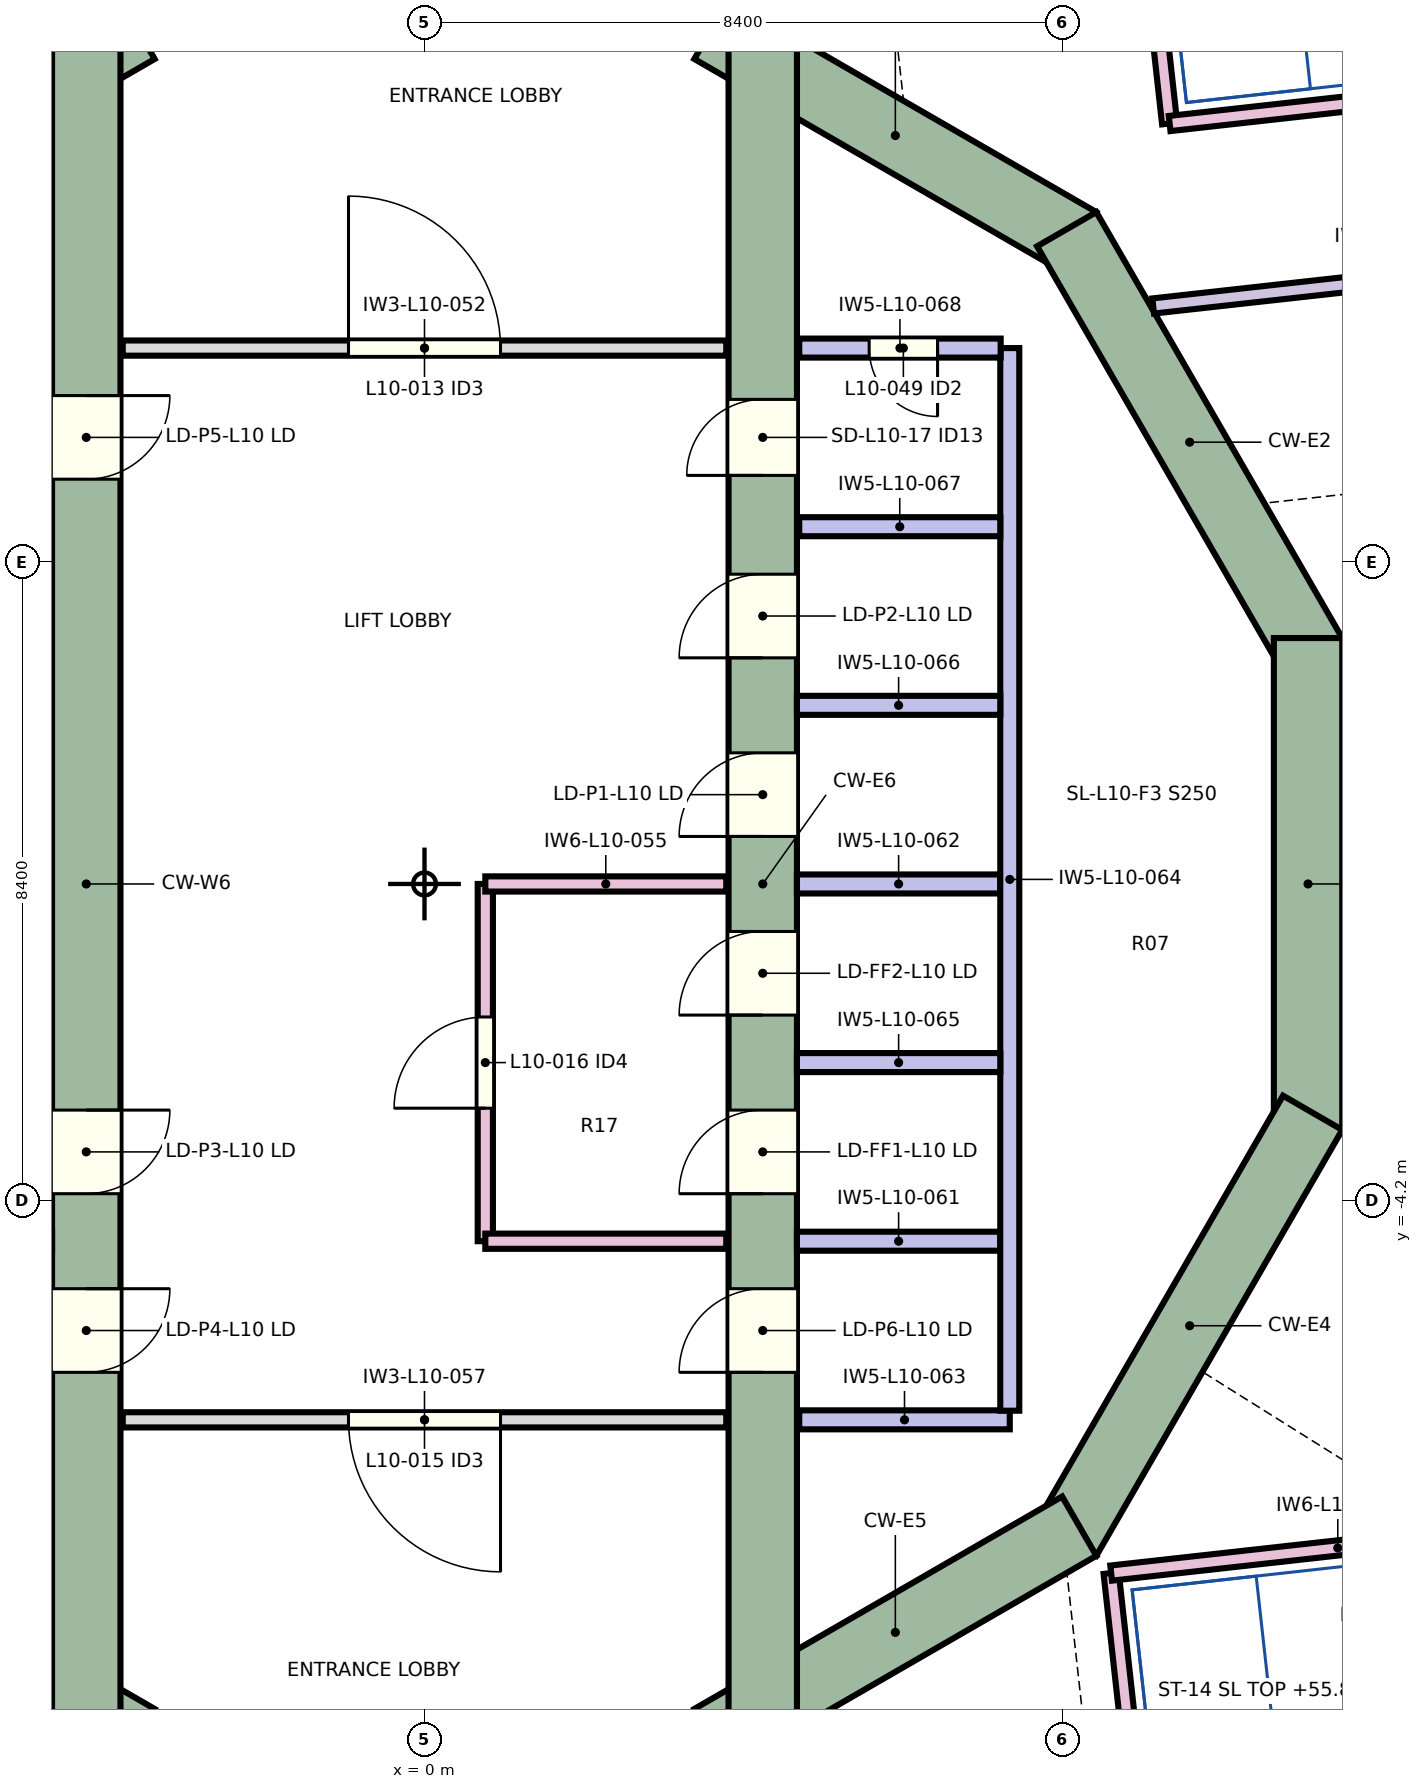
"""IFC4 building model, lengths in metres.
Left out: names, types, materials, properties, quantities, classifications, styles, units other than length and angle.
Written with IfcOpenShell. Run it as: python <this file> out.ifc"""

import sys

from ifc_helpers import new_model, si_unit, direction, frame, frame_2d, origin, place, context, subcontext, project, spatial, rectangle, extrude, element, fill, save


model = new_model("IFC4")
c1 = context("Model", 3, precision=1e-05, world=origin(), true_north=direction((0.0, 1.0)))
c2 = subcontext(c1, "Body", "Model", "MODEL_VIEW")
j1 = project(units=[si_unit("LENGTHUNIT", "METRE"), si_unit("PLANEANGLEUNIT", "RADIAN")], contexts=[c1])
p1 = place(None, origin())
s1 = spatial("IfcSite", under=j1, at=p1, CompositionType="ELEMENT")
p2 = place(p1, origin())
s2 = spatial("IfcBuilding", under=s1, at=p2, CompositionType="ELEMENT")
p3 = place(p2, frame((0.0, 0.0, 53.9)))
s3 = spatial("IfcBuildingStorey", under=s2, at=p3, CompositionType="ELEMENT", Elevation=53.9)
for number, where, z_axis, x_axis in (
    (1, (-3.775, -11.243, 0.0), (0.0, 0.0, 1.0), (-0.866, 0.5, 0.0)),
    (2, (-8.614, 8.449, 0.0), (0.0, 0.0, 1.0), (0.866, 0.5, 0.0)),
):
    element("IfcWall", number, at=place(p3, frame(where, z_axis=z_axis, x_axis=x_axis)), inside=s3, PredefinedType="SHEAR", context=c2, shape_type="SweptSolid", body=[
        extrude(rectangle(XDim=5.587, YDim=0.9, at=frame_2d((2.794, 0.0))), origin(), (0.0, 0.0, 1.0), 3.8),
    ])
p4 = place(p3, frame((-4.45, 11.633, 0.0), z_axis=(0.0, 0.0, 1.0), x_axis=(0.0, -1.0, 0.0)))
e3 = element("IfcWall", 3, at=p4, inside=s3, PredefinedType="SHEAR", context=c2, shape_type="SweptSolid", body=[
    extrude(rectangle(XDim=23.265, YDim=0.9, at=frame_2d((11.633, 0.0))), origin(), (0.0, 0.0, 1.0), 3.8),
])
p5 = place(p4, frame((14.607, 0.0, 0.0)))
e4 = element("IfcOpeningElement", 4, at=p5, cuts=e3, PredefinedType="OPENING", context=c2, shape_type="SweptSolid", body=[
    extrude(rectangle(XDim=1.1, YDim=2.1, at=frame_2d((0.55, 1.05))), frame((0.0, 0.46, 0.0), z_axis=(0.0, -1.0, 0.0), x_axis=(1.0, 0.0, 0.0)), (0.0, 0.0, 1.0), 0.92),
])
p6 = place(p4, frame((16.958, 0.0, 0.0)))
e5 = element("IfcOpeningElement", 5, at=p6, cuts=e3, PredefinedType="OPENING", context=c2, shape_type="SweptSolid", body=[
    extrude(rectangle(XDim=1.1, YDim=2.1, at=frame_2d((0.55, 1.05))), frame((0.0, 0.46, 0.0), z_axis=(0.0, -1.0, 0.0), x_axis=(1.0, 0.0, 0.0)), (0.0, 0.0, 1.0), 0.92),
])
p7 = place(p4, frame((5.208, 0.0, 0.0)))
e6 = element("IfcOpeningElement", 6, at=p7, cuts=e3, PredefinedType="OPENING", context=c2, shape_type="SweptSolid", body=[
    extrude(rectangle(XDim=1.1, YDim=2.1, at=frame_2d((0.55, 1.05))), frame((0.0, 0.46, 0.0), z_axis=(0.0, -1.0, 0.0), x_axis=(1.0, 0.0, 0.0)), (0.0, 0.0, 1.0), 0.92),
])
p8 = place(p3, frame((3.775, 11.243, 0.0), z_axis=(0.0, 0.0, 1.0), x_axis=(0.866026961591, -0.49999730179, 0.0)))
e7 = element("IfcWall", 7, at=p8, inside=s3, PredefinedType="SHEAR", context=c2, shape_type="SweptSolid", body=[
    extrude(rectangle(XDim=5.587, YDim=0.9, at=frame_2d((2.794, 0.0))), origin(), (0.0, 0.0, 1.0), 3.8),
])
p9 = place(p3, frame((8.449, 8.614, 0.0), z_axis=(0.0, 0.0, 1.0), x_axis=(0.499990282633, -0.866031014036, 0.0)))
e8 = element("IfcWall", 8, at=p9, inside=s3, PredefinedType="SHEAR", context=c2, shape_type="SweptSolid", body=[
    extrude(rectangle(XDim=6.47, YDim=0.9, at=frame_2d((3.235, 0.0))), origin(), (0.0, 0.0, 1.0), 3.8),
])
p10 = place(p3, frame((11.624, 3.235, 0.0), z_axis=(0.0, 0.0, 1.0), x_axis=(0.0, -1.0, 0.0)))
e9 = element("IfcWall", 9, at=p10, inside=s3, PredefinedType="SHEAR", context=c2, shape_type="SweptSolid", body=[
    extrude(rectangle(XDim=6.471, YDim=0.9, at=frame_2d((3.235, 0.0))), origin(), (0.0, 0.0, 1.0), 3.8),
])
p11 = place(p3, frame((11.684, -3.01, 0.0), z_axis=(0.0, 0.0, 1.0), x_axis=(-0.499990282633, -0.866031014036, 0.0)))
e10 = element("IfcWall", 10, at=p11, inside=s3, PredefinedType="SHEAR", context=c2, shape_type="SweptSolid", body=[
    extrude(rectangle(XDim=6.47, YDim=0.9, at=frame_2d((3.235, 0.0))), origin(), (0.0, 0.0, 1.0), 3.8),
])
p12 = place(p3, frame((8.614, -8.449, 0.0), z_axis=(0.0, 0.0, 1.0), x_axis=(-0.866026961591, -0.49999730179, 0.0)))
e11 = element("IfcWall", 11, at=p12, inside=s3, PredefinedType="SHEAR", context=c2, shape_type="SweptSolid", body=[
    extrude(rectangle(XDim=5.587, YDim=0.9, at=frame_2d((2.794, 0.0))), origin(), (0.0, 0.0, 1.0), 3.8),
])
p13 = place(p3, frame((4.45, -11.633, 0.0), z_axis=(0.0, 0.0, 1.0), x_axis=(0.0, 1.0, 0.0)))
e12 = element("IfcWall", 12, at=p13, inside=s3, PredefinedType="SHEAR", context=c2, shape_type="SweptSolid", body=[
    extrude(rectangle(XDim=23.265, YDim=0.9, at=frame_2d((11.633, 0.0))), origin(), (0.0, 0.0, 1.0), 3.8),
])
p14 = place(p13, frame((7.558, 0.0, 0.0)))
e13 = element("IfcOpeningElement", 13, at=p14, cuts=e12, PredefinedType="OPENING", context=c2, shape_type="SweptSolid", body=[
    extrude(rectangle(XDim=1.1, YDim=2.1, at=frame_2d((0.55, 1.05))), frame((0.0, 0.46, 0.0), z_axis=(0.0, -1.0, 0.0), x_axis=(1.0, 0.0, 0.0)), (0.0, 0.0, 1.0), 0.92),
])
p15 = place(p13, frame((9.907, 0.0, 0.0)))
e14 = element("IfcOpeningElement", 14, at=p15, cuts=e12, PredefinedType="OPENING", context=c2, shape_type="SweptSolid", body=[
    extrude(rectangle(XDim=1.1, YDim=2.1, at=frame_2d((0.55, 1.05))), frame((0.0, 0.46, 0.0), z_axis=(0.0, -1.0, 0.0), x_axis=(1.0, 0.0, 0.0)), (0.0, 0.0, 1.0), 0.92),
])
p16 = place(p13, frame((12.258, 0.0, 0.0)))
e15 = element("IfcOpeningElement", 15, at=p16, cuts=e12, PredefinedType="OPENING", context=c2, shape_type="SweptSolid", body=[
    extrude(rectangle(XDim=1.1, YDim=2.1, at=frame_2d((0.55, 1.05))), frame((0.0, 0.46, 0.0), z_axis=(0.0, -1.0, 0.0), x_axis=(1.0, 0.0, 0.0)), (0.0, 0.0, 1.0), 0.92),
])
p17 = place(p13, frame((14.607, 0.0, 0.0)))
e16 = element("IfcOpeningElement", 16, at=p17, cuts=e12, PredefinedType="OPENING", context=c2, shape_type="SweptSolid", body=[
    extrude(rectangle(XDim=1.1, YDim=2.1, at=frame_2d((0.55, 1.05))), frame((0.0, 0.46, 0.0), z_axis=(0.0, -1.0, 0.0), x_axis=(1.0, 0.0, 0.0)), (0.0, 0.0, 1.0), 0.92),
])
p18 = place(p13, frame((5.208, 0.0, 0.0)))
e17 = element("IfcOpeningElement", 17, at=p18, cuts=e12, PredefinedType="OPENING", context=c2, shape_type="SweptSolid", body=[
    extrude(rectangle(XDim=1.1, YDim=2.1, at=frame_2d((0.55, 1.05))), frame((0.0, 0.46, 0.0), z_axis=(0.0, -1.0, 0.0), x_axis=(1.0, 0.0, 0.0)), (0.0, 0.0, 1.0), 0.92),
])
p19 = place(p13, frame((17.008, 0.0, 0.0)))
e18 = element("IfcOpeningElement", 18, at=p19, cuts=e12, PredefinedType="OPENING", context=c2, shape_type="SweptSolid", body=[
    extrude(rectangle(XDim=1.0, YDim=2.1, at=frame_2d((0.5, 1.05))), frame((0.0, 0.46, 0.0), z_axis=(0.0, -1.0, 0.0), x_axis=(1.0, 0.0, 0.0)), (0.0, 0.0, 1.0), 0.92),
])
p20 = place(p3, frame((-3.97, 7.05, 0.0), z_axis=(0.0, 0.0, 1.0), x_axis=(1.0, 0.0, 0.0)))
e19 = element("IfcWall", 19, at=p20, inside=s3, PredefinedType="PARTITIONING", context=c2, shape_type="SweptSolid", body=[
    extrude(rectangle(XDim=7.94, YDim=0.2, at=frame_2d((3.97, 0.0))), origin(), (0.0, 0.0, 1.0), 3.55),
])
p21 = place(p20, frame((2.97, 0.0, 0.0)))
e20 = element("IfcOpeningElement", 20, at=p21, cuts=e19, PredefinedType="OPENING", context=c2, shape_type="SweptSolid", body=[
    extrude(rectangle(XDim=2.0, YDim=2.1, at=frame_2d((1.0, 1.05))), frame((0.0, 0.11, 0.0), z_axis=(0.0, -1.0, 0.0), x_axis=(1.0, 0.0, 0.0)), (0.0, 0.0, 1.0), 0.22),
])
p22 = place(p3, frame((0.8, -4.7, 0.0), z_axis=(0.0, 0.0, 1.0), x_axis=(0.0, 1.0, 0.0)))
e21 = element("IfcWall", 21, at=p22, inside=s3, PredefinedType="SOLIDWALL", context=c2, shape_type="SweptSolid", body=[
    extrude(rectangle(XDim=4.7, YDim=0.2, at=frame_2d((2.35, 0.0))), origin(), (0.0, 0.0, 1.0), 3.55),
])
p23 = place(p22, frame((1.75, 0.0, 0.0)))
e22 = element("IfcOpeningElement", 22, at=p23, cuts=e21, PredefinedType="OPENING", context=c2, shape_type="SweptSolid", body=[
    extrude(rectangle(XDim=1.2, YDim=2.1, at=frame_2d((0.6, 1.05))), frame((0.0, 0.11, 0.0), z_axis=(0.0, -1.0, 0.0), x_axis=(1.0, 0.0, 0.0)), (0.0, 0.0, 1.0), 0.22),
])
p24 = place(p3, frame((0.8, 0.0, 0.0), z_axis=(0.0, 0.0, 1.0), x_axis=(1.0, 0.0, 0.0)))
e23 = element("IfcWall", 23, at=p24, inside=s3, PredefinedType="SOLIDWALL", context=c2, shape_type="SweptSolid", body=[
    extrude(rectangle(XDim=3.17, YDim=0.2, at=frame_2d((1.585, 0.0))), origin(), (0.0, 0.0, 1.0), 3.55),
])
p25 = place(p3, frame((3.97, -7.05, 0.0), z_axis=(0.0, 0.0, 1.0), x_axis=(-1.0, 0.0, 0.0)))
e24 = element("IfcWall", 24, at=p25, inside=s3, PredefinedType="PARTITIONING", context=c2, shape_type="SweptSolid", body=[
    extrude(rectangle(XDim=7.94, YDim=0.2, at=frame_2d((3.97, 0.0))), origin(), (0.0, 0.0, 1.0), 3.55),
])
p26 = place(p25, frame((2.97, 0.0, 0.0)))
e25 = element("IfcOpeningElement", 25, at=p26, cuts=e24, PredefinedType="OPENING", context=c2, shape_type="SweptSolid", body=[
    extrude(rectangle(XDim=2.0, YDim=2.1, at=frame_2d((1.0, 1.05))), frame((0.0, 0.11, 0.0), z_axis=(0.0, -1.0, 0.0), x_axis=(1.0, 0.0, 0.0)), (0.0, 0.0, 1.0), 0.22),
])
p27 = place(p3, frame((3.97, -4.7, 0.0), z_axis=(0.0, 0.0, 1.0), x_axis=(-1.0, 0.0, 0.0)))
e26 = element("IfcWall", 26, at=p27, inside=s3, PredefinedType="SOLIDWALL", context=c2, shape_type="SweptSolid", body=[
    extrude(rectangle(XDim=3.17, YDim=0.2, at=frame_2d((1.585, 0.0))), origin(), (0.0, 0.0, 1.0), 3.55),
])
for number, where, z_axis, x_axis in (
    (27, (4.9, -4.7, 0.0), (0.0, 0.0, 1.0), (1.0, 0.0, 0.0)),
    (28, (4.9, 0.0, 0.0), (0.0, 0.0, 1.0), (1.0, 0.0, 0.0)),
):
    element("IfcWall", number, at=place(p3, frame(where, z_axis=z_axis, x_axis=x_axis)), inside=s3, PredefinedType="SOLIDWALL", context=c2, shape_type="SweptSolid", body=[
        extrude(rectangle(XDim=2.675, YDim=0.25, at=frame_2d((1.337, 0.0))), origin(), (0.0, 0.0, 1.0), 3.55),
    ])
p28 = place(p3, frame((4.93, -7.05, 0.0), z_axis=(0.0, 0.0, 1.0), x_axis=(1.0, 0.0, 0.0)))
e29 = element("IfcWall", 29, at=p28, inside=s3, PredefinedType="SOLIDWALL", context=c2, shape_type="SweptSolid", body=[
    extrude(rectangle(XDim=2.77, YDim=0.25, at=frame_2d((1.385, 0.0))), origin(), (0.0, 0.0, 1.0), 3.55),
])
p29 = place(p3, frame((7.7, -6.93, 0.0), z_axis=(0.0, 0.0, 1.0), x_axis=(0.0, 1.0, 0.0)))
e30 = element("IfcWall", 30, at=p29, inside=s3, PredefinedType="SOLIDWALL", context=c2, shape_type="SweptSolid", body=[
    extrude(rectangle(XDim=13.98, YDim=0.25, at=frame_2d((6.99, 0.0))), origin(), (0.0, 0.0, 1.0), 3.55),
])
for number, where, z_axis, x_axis in (
    (31, (7.575, -2.35, 0.0), (0.0, 0.0, 1.0), (-1.0, 0.0, 0.0)),
    (32, (7.575, 2.35, 0.0), (0.0, 0.0, 1.0), (-1.0, 0.0, 0.0)),
):
    element("IfcWall", number, at=place(p3, frame(where, z_axis=z_axis, x_axis=x_axis)), inside=s3, PredefinedType="SOLIDWALL", context=c2, shape_type="SweptSolid", body=[
        extrude(rectangle(XDim=2.675, YDim=0.25, at=frame_2d((1.337, 0.0))), origin(), (0.0, 0.0, 1.0), 3.55),
    ])
p30 = place(p3, frame((7.575, 4.7, 0.0), z_axis=(0.0, 0.0, 1.0), x_axis=(-1.0, 0.0, 0.0)))
e33 = element("IfcWall", 33, at=p30, inside=s3, PredefinedType="SOLIDWALL", context=c2, shape_type="SweptSolid", body=[
    extrude(rectangle(XDim=2.645, YDim=0.25, at=frame_2d((1.323, 0.0))), origin(), (0.0, 0.0, 1.0), 3.55),
])
p31 = place(p3, frame((7.58, 7.05, 0.0), z_axis=(0.0, 0.0, 1.0), x_axis=(-1.0, 0.0, 0.0)))
e34 = element("IfcWall", 34, at=p31, inside=s3, PredefinedType="SOLIDWALL", context=c2, shape_type="SweptSolid", body=[
    extrude(rectangle(XDim=2.65, YDim=0.25, at=frame_2d((1.325, 0.0))), origin(), (0.0, 0.0, 1.0), 3.55),
])
p32 = place(p31, frame((0.83, 0.0, 0.0)))
e35 = element("IfcOpeningElement", 35, at=p32, cuts=e34, PredefinedType="OPENING", context=c2, shape_type="SweptSolid", body=[
    extrude(rectangle(XDim=0.9, YDim=2.1, at=frame_2d((0.45, 1.05))), frame((0.0, 0.135, 0.0), z_axis=(0.0, -1.0, 0.0), x_axis=(1.0, 0.0, 0.0)), (0.0, 0.0, 1.0), 0.27),
])
p33 = place(p3, frame((9.033, -9.066, 0.0), z_axis=(0.0, 0.0, 1.0), x_axis=(0.11030110325, -0.993898217436, 0.0)))
e36 = element("IfcWall", 36, at=p33, inside=s3, PredefinedType="SOLIDWALL", context=c2, shape_type="SweptSolid", body=[
    extrude(rectangle(XDim=3.493, YDim=0.2, at=frame_2d((1.746, 0.0))), origin(), (0.0, 0.0, 1.0), 3.55),
])
p34 = place(p3, frame((9.434, 13.334, 0.0), z_axis=(0.0, 0.0, 1.0), x_axis=(0.11027153821, -0.993901498067, 0.0)))
e37 = element("IfcWall", 37, at=p34, inside=s3, PredefinedType="SOLIDWALL", context=c2, shape_type="SweptSolid", body=[
    extrude(rectangle(XDim=3.35, YDim=0.2, at=frame_2d((1.675, 0.0))), origin(), (0.0, 0.0, 1.0), 3.55),
])
p35 = place(p3, frame((9.586, 7.604, 0.0), z_axis=(0.0, 0.0, 1.0), x_axis=(0.993896223863, 0.110319065398, 0.0)))
e38 = element("IfcWall", 38, at=p35, inside=s3, PredefinedType="PARTITIONING", context=c2, shape_type="SweptSolid", body=[
    extrude(rectangle(XDim=6.433, YDim=0.2, at=frame_2d((3.217, 0.0))), origin(), (0.0, 0.0, 1.0), 3.55),
])
p36 = place(p3, frame((9.803, 10.004, 0.0), z_axis=(0.0, 0.0, 1.0), x_axis=(0.993897498792, 0.11030757859, 0.0)))
e39 = element("IfcWall", 39, at=p36, inside=s3, PredefinedType="SOLIDWALL", context=c2, shape_type="SweptSolid", body=[
    extrude(rectangle(XDim=6.053, YDim=0.2, at=frame_2d((3.027, 0.0))), origin(), (0.0, 0.0, 1.0), 3.55),
])
p37 = place(p3, frame((14.997, -8.404, 0.0), z_axis=(0.0, 0.0, 1.0), x_axis=(-0.993897125329, -0.110310943534, 0.0)))
e40 = element("IfcWall", 40, at=p37, inside=s3, PredefinedType="SOLIDWALL", context=c2, shape_type="SweptSolid", body=[
    extrude(rectangle(XDim=6.0, YDim=0.2, at=frame_2d((3.0, 0.0))), origin(), (0.0, 0.0, 1.0), 3.55),
])
p38 = place(p21, origin())
e41 = element("IfcDoor", 41, at=p38, inside=s3, OperationType="NOTDEFINED", PredefinedType="DOOR", context=c2, shape_type="SweptSolid", body=[
    extrude(rectangle(XDim=2.0, YDim=2.1, at=frame_2d((1.0, 1.05))), frame((0.0, 0.025, 0.0), z_axis=(0.0, -1.0, 0.0), x_axis=(1.0, 0.0, 0.0)), (0.0, 0.0, 1.0), 0.05),
])
fill(e20, e41)
p39 = place(p26, origin())
e42 = element("IfcDoor", 42, at=p39, inside=s3, OperationType="NOTDEFINED", PredefinedType="DOOR", context=c2, shape_type="SweptSolid", body=[
    extrude(rectangle(XDim=2.0, YDim=2.1, at=frame_2d((1.0, 1.05))), frame((0.0, 0.025, 0.0), z_axis=(0.0, -1.0, 0.0), x_axis=(1.0, 0.0, 0.0)), (0.0, 0.0, 1.0), 0.05),
])
fill(e25, e42)
p40 = place(p23, origin())
e43 = element("IfcDoor", 43, at=p40, inside=s3, OperationType="NOTDEFINED", PredefinedType="DOOR", context=c2, shape_type="SweptSolid", body=[
    extrude(rectangle(XDim=1.2, YDim=2.1, at=frame_2d((0.6, 1.05))), frame((0.0, 0.025, 0.0), z_axis=(0.0, -1.0, 0.0), x_axis=(1.0, 0.0, 0.0)), (0.0, 0.0, 1.0), 0.05),
])
fill(e22, e43)
p41 = place(p32, origin())
e44 = element("IfcDoor", 44, at=p41, inside=s3, OperationType="NOTDEFINED", PredefinedType="DOOR", context=c2, shape_type="SweptSolid", body=[
    extrude(rectangle(XDim=0.9, YDim=2.1, at=frame_2d((0.45, 1.05))), frame((0.0, 0.025, 0.0), z_axis=(0.0, -1.0, 0.0), x_axis=(1.0, 0.0, 0.0)), (0.0, 0.0, 1.0), 0.05),
])
fill(e35, e44)
p42 = place(p14, origin())
e45 = element("IfcDoor", 45, at=p42, inside=s3, OperationType="SLIDING_TO_LEFT", PredefinedType="DOOR", context=c2, shape_type="SweptSolid", body=[
    extrude(rectangle(XDim=1.1, YDim=2.1, at=frame_2d((0.55, 1.05))), frame((0.0, 0.025, 0.0), z_axis=(0.0, -1.0, 0.0), x_axis=(1.0, 0.0, 0.0)), (0.0, 0.0, 1.0), 0.05),
])
fill(e13, e45)
p43 = place(p15, origin())
e46 = element("IfcDoor", 46, at=p43, inside=s3, OperationType="SLIDING_TO_LEFT", PredefinedType="DOOR", context=c2, shape_type="SweptSolid", body=[
    extrude(rectangle(XDim=1.1, YDim=2.1, at=frame_2d((0.55, 1.05))), frame((0.0, 0.025, 0.0), z_axis=(0.0, -1.0, 0.0), x_axis=(1.0, 0.0, 0.0)), (0.0, 0.0, 1.0), 0.05),
])
fill(e14, e46)
p44 = place(p16, origin())
e47 = element("IfcDoor", 47, at=p44, inside=s3, OperationType="SLIDING_TO_LEFT", PredefinedType="DOOR", context=c2, shape_type="SweptSolid", body=[
    extrude(rectangle(XDim=1.1, YDim=2.1, at=frame_2d((0.55, 1.05))), frame((0.0, 0.025, 0.0), z_axis=(0.0, -1.0, 0.0), x_axis=(1.0, 0.0, 0.0)), (0.0, 0.0, 1.0), 0.05),
])
fill(e15, e47)
p45 = place(p17, origin())
e48 = element("IfcDoor", 48, at=p45, inside=s3, OperationType="SLIDING_TO_LEFT", PredefinedType="DOOR", context=c2, shape_type="SweptSolid", body=[
    extrude(rectangle(XDim=1.1, YDim=2.1, at=frame_2d((0.55, 1.05))), frame((0.0, 0.025, 0.0), z_axis=(0.0, -1.0, 0.0), x_axis=(1.0, 0.0, 0.0)), (0.0, 0.0, 1.0), 0.05),
])
fill(e16, e48)
p46 = place(p5, origin())
e49 = element("IfcDoor", 49, at=p46, inside=s3, OperationType="SLIDING_TO_LEFT", PredefinedType="DOOR", context=c2, shape_type="SweptSolid", body=[
    extrude(rectangle(XDim=1.1, YDim=2.1, at=frame_2d((0.55, 1.05))), frame((0.0, 0.025, 0.0), z_axis=(0.0, -1.0, 0.0), x_axis=(1.0, 0.0, 0.0)), (0.0, 0.0, 1.0), 0.05),
])
fill(e4, e49)
p47 = place(p6, origin())
e50 = element("IfcDoor", 50, at=p47, inside=s3, OperationType="SLIDING_TO_LEFT", PredefinedType="DOOR", context=c2, shape_type="SweptSolid", body=[
    extrude(rectangle(XDim=1.1, YDim=2.1, at=frame_2d((0.55, 1.05))), frame((0.0, 0.025, 0.0), z_axis=(0.0, -1.0, 0.0), x_axis=(1.0, 0.0, 0.0)), (0.0, 0.0, 1.0), 0.05),
])
fill(e5, e50)
p48 = place(p7, origin())
e51 = element("IfcDoor", 51, at=p48, inside=s3, OperationType="SLIDING_TO_LEFT", PredefinedType="DOOR", context=c2, shape_type="SweptSolid", body=[
    extrude(rectangle(XDim=1.1, YDim=2.1, at=frame_2d((0.55, 1.05))), frame((0.0, 0.025, 0.0), z_axis=(0.0, -1.0, 0.0), x_axis=(1.0, 0.0, 0.0)), (0.0, 0.0, 1.0), 0.05),
])
fill(e6, e51)
p49 = place(p18, origin())
e52 = element("IfcDoor", 52, at=p49, inside=s3, OperationType="SLIDING_TO_LEFT", PredefinedType="DOOR", context=c2, shape_type="SweptSolid", body=[
    extrude(rectangle(XDim=1.1, YDim=2.1, at=frame_2d((0.55, 1.05))), frame((0.0, 0.025, 0.0), z_axis=(0.0, -1.0, 0.0), x_axis=(1.0, 0.0, 0.0)), (0.0, 0.0, 1.0), 0.05),
])
fill(e17, e52)
p50 = place(p19, origin())
e53 = element("IfcDoor", 53, at=p50, inside=s3, OperationType="NOTDEFINED", PredefinedType="DOOR", context=c2, shape_type="SweptSolid", body=[
    extrude(rectangle(XDim=1.0, YDim=2.1, at=frame_2d((0.5, 1.05))), frame((0.0, 0.025, 0.0), z_axis=(0.0, -1.0, 0.0), x_axis=(1.0, 0.0, 0.0)), (0.0, 0.0, 1.0), 0.05),
])
fill(e18, e53)
save(model, sys.argv[1])
